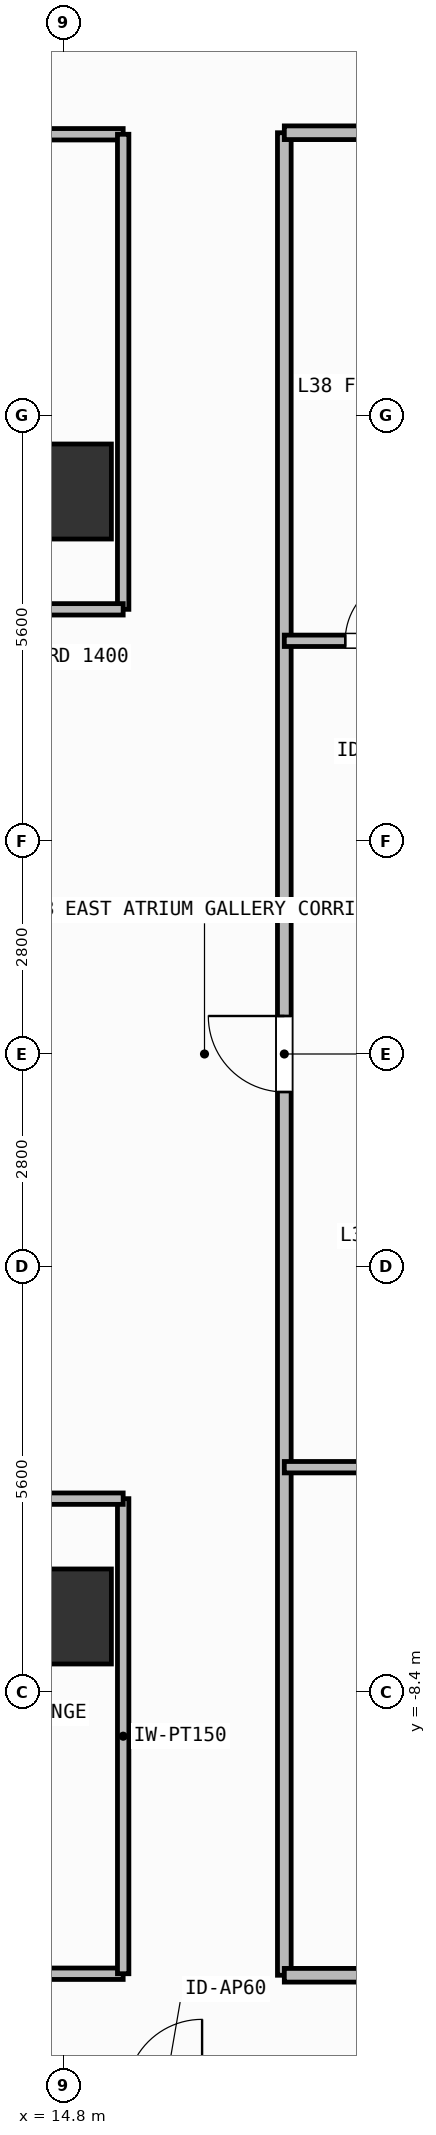
"""IFC4 building model, lengths in metres.
Left out: names, types, materials, properties, quantities, classifications, styles, units other than length and angle.
Written with IfcOpenShell. Run it as: python <this file> out.ifc"""

import sys

from ifc_helpers import new_model, si_unit, direction, frame, frame_2d, origin, origin_2d, place, context, subcontext, project, spatial, rectangle, extrude, element, fill, save


model = new_model("IFC4")
c1 = context("Model", 3, precision=1e-05, world=origin(), true_north=direction((0.0, 1.0)))
c2 = subcontext(c1, "Body", "Model", "MODEL_VIEW")
j1 = project(units=[si_unit("LENGTHUNIT", "METRE"), si_unit("PLANEANGLEUNIT", "RADIAN")], contexts=[c1])
p1 = place(None, origin())
s1 = spatial("IfcSite", under=j1, at=p1, CompositionType="ELEMENT")
p2 = place(p1, origin())
s2 = spatial("IfcBuilding", under=s1, at=p2, CompositionType="ELEMENT")
p3 = place(p2, frame((0.0, 0.0, 152.4)))
s3 = spatial("IfcBuildingStorey", under=s2, at=p3, CompositionType="ELEMENT", Elevation=152.4)
for number, where, z_axis, x_axis in (
    (1, (14.8, -7.4, 0.0), (0.0, 0.0, 1.0), (1.0, 0.0, 0.0)),
    (2, (14.8, 7.4, 0.0), (0.0, 0.0, 1.0), (1.0, 0.0, 0.0)),
):
    element("IfcColumn", number, at=place(p3, frame(where, z_axis=z_axis, x_axis=x_axis)), inside=s3, PredefinedType="COLUMN", context=c2, shape_type="SweptSolid", body=[
        extrude(rectangle(XDim=1.25, YDim=1.25, at=origin_2d()), origin(), (0.0, 0.0, 1.0), 3.9),
    ])
p4 = place(p3, frame((10.1, -12.1, 0.0), z_axis=(0.0, 0.0, 1.0), x_axis=(1.0, 0.0, 0.0)))
e3 = element("IfcWall", 3, at=p4, inside=s3, PredefinedType="PARTITIONING", context=c2, shape_type="SweptSolid", body=[
    extrude(rectangle(XDim=5.48, YDim=0.15, at=frame_2d((2.74, 0.0))), origin(), (0.0, 0.0, 1.0), 3.6),
])
p5 = place(p4, frame((2.29, 0.0, 0.0)))
e4 = element("IfcOpeningElement", 4, at=p5, cuts=e3, PredefinedType="OPENING", context=c2, shape_type="SweptSolid", body=[
    extrude(rectangle(XDim=0.9, YDim=2.1, at=frame_2d((0.45, 1.05))), frame((0.0, 0.085, 0.0), z_axis=(0.0, -1.0, 0.0), x_axis=(1.0, 0.0, 0.0)), (0.0, 0.0, 1.0), 0.17),
])
p6 = place(p3, frame((8.36, 12.1, 0.0), z_axis=(0.0, 0.0, 1.0), x_axis=(1.0, 0.0, 0.0)))
e5 = element("IfcWall", 5, at=p6, inside=s3, PredefinedType="PARTITIONING", context=c2, shape_type="SweptSolid", body=[
    extrude(rectangle(XDim=7.22, YDim=0.15, at=frame_2d((3.61, 0.0))), origin(), (0.0, 0.0, 1.0), 3.6),
])
p7 = place(p6, frame((3.513, 0.0, 0.0)))
e6 = element("IfcOpeningElement", 6, at=p7, cuts=e5, PredefinedType="OPENING", context=c2, shape_type="SweptSolid", body=[
    extrude(rectangle(XDim=0.9, YDim=2.1, at=frame_2d((0.45, 1.05))), frame((0.0, 0.085, 0.0), z_axis=(0.0, -1.0, 0.0), x_axis=(1.0, 0.0, 0.0)), (0.0, 0.0, 1.0), 0.17),
])
p8 = place(p3, frame((17.7, -12.12, 0.0), z_axis=(0.0, 0.0, 1.0), x_axis=(0.0, 1.0, 0.0)))
e7 = element("IfcWall", 7, at=p8, inside=s3, PredefinedType="PARTITIONING", context=c2, shape_type="SweptSolid", body=[
    extrude(rectangle(XDim=24.24, YDim=0.18, at=frame_2d((12.12, 0.0))), origin(), (0.0, 0.0, 1.0), 3.6),
])
p9 = place(p8, frame((11.62, 0.0, 0.0)))
e8 = element("IfcOpeningElement", 8, at=p9, cuts=e7, PredefinedType="OPENING", context=c2, shape_type="SweptSolid", body=[
    extrude(rectangle(XDim=1.0, YDim=2.2, at=frame_2d((0.5, 1.1))), frame((0.0, 0.1, 0.0), z_axis=(0.0, -1.0, 0.0), x_axis=(1.0, 0.0, 0.0)), (0.0, 0.0, 1.0), 0.2),
])
p10 = place(p3, frame((17.7, 5.436, 0.0), z_axis=(0.0, 0.0, 1.0), x_axis=(1.0, 0.0, 0.0)))
e9 = element("IfcWall", 9, at=p10, inside=s3, PredefinedType="PARTITIONING", context=c2, shape_type="SweptSolid", body=[
    extrude(rectangle(XDim=2.292, YDim=0.15, at=frame_2d((1.146, 0.0))), origin(), (0.0, 0.0, 1.0), 3.6),
])
p11 = place(p10, frame((0.801, 0.0, 0.0)))
e10 = element("IfcOpeningElement", 10, at=p11, cuts=e9, PredefinedType="OPENING", context=c2, shape_type="SweptSolid", body=[
    extrude(rectangle(XDim=0.85, YDim=2.1, at=frame_2d((0.425, 1.05))), frame((0.0, 0.085, 0.0), z_axis=(0.0, -1.0, 0.0), x_axis=(1.0, 0.0, 0.0)), (0.0, 0.0, 1.0), 0.17),
])
p12 = place(p3, frame((17.7, -5.436, 0.0), z_axis=(0.0, 0.0, 1.0), x_axis=(1.0, 0.0, 0.0)))
e11 = element("IfcWall", 11, at=p12, inside=s3, PredefinedType="PARTITIONING", context=c2, shape_type="SweptSolid", body=[
    extrude(rectangle(XDim=5.59, YDim=0.15, at=frame_2d((2.795, 0.0))), origin(), (0.0, 0.0, 1.0), 3.6),
])
p13 = place(p12, frame((2.812, 0.0, 0.0)))
e12 = element("IfcOpeningElement", 12, at=p13, cuts=e11, PredefinedType="OPENING", context=c2, shape_type="SweptSolid", body=[
    extrude(rectangle(XDim=0.85, YDim=2.1, at=frame_2d((0.425, 1.05))), frame((0.0, 0.085, 0.0), z_axis=(0.0, -1.0, 0.0), x_axis=(1.0, 0.0, 0.0)), (0.0, 0.0, 1.0), 0.17),
])
p14 = place(p3, frame((15.58, -12.1, 0.0), z_axis=(0.0, 0.0, 1.0), x_axis=(0.0, 1.0, 0.0)))
e13 = element("IfcWall", 13, at=p14, inside=s3, PredefinedType="PARTITIONING", context=c2, shape_type="SweptSolid", body=[
    extrude(rectangle(XDim=6.25, YDim=0.15, at=frame_2d((3.125, 0.0))), origin(), (0.0, 0.0, 1.0), 3.6),
])
p15 = place(p3, frame((8.96, -5.85, 0.0), z_axis=(0.0, 0.0, 1.0), x_axis=(1.0, 0.0, 0.0)))
e14 = element("IfcWall", 14, at=p15, inside=s3, PredefinedType="PARTITIONING", context=c2, shape_type="SweptSolid", body=[
    extrude(rectangle(XDim=6.62, YDim=0.15, at=frame_2d((3.31, 0.0))), origin(), (0.0, 0.0, 1.0), 3.6),
])
p16 = place(p3, frame((15.58, 5.85, 0.0), z_axis=(0.0, 0.0, 1.0), x_axis=(0.0, 1.0, 0.0)))
e15 = element("IfcWall", 15, at=p16, inside=s3, PredefinedType="PARTITIONING", context=c2, shape_type="SweptSolid", body=[
    extrude(rectangle(XDim=6.25, YDim=0.15, at=frame_2d((3.125, 0.0))), origin(), (0.0, 0.0, 1.0), 3.6),
])
p17 = place(p3, frame((8.96, 5.85, 0.0), z_axis=(0.0, 0.0, 1.0), x_axis=(1.0, 0.0, 0.0)))
e16 = element("IfcWall", 16, at=p17, inside=s3, PredefinedType="PARTITIONING", context=c2, shape_type="SweptSolid", body=[
    extrude(rectangle(XDim=6.62, YDim=0.15, at=frame_2d((3.31, 0.0))), origin(), (0.0, 0.0, 1.0), 3.6),
])
for number, where, z_axis, x_axis in (
    (17, (17.7, -12.12, 0.0), (0.0, 0.0, 1.0), (1.0, 0.0, 0.0)),
    (18, (17.7, 12.12, 0.0), (0.0, 0.0, 1.0), (1.0, 0.0, 0.0)),
):
    element("IfcWall", number, at=place(p3, frame(where, z_axis=z_axis, x_axis=x_axis)), inside=s3, PredefinedType="PARTITIONING", context=c2, shape_type="SweptSolid", body=[
        extrude(rectangle(XDim=9.83, YDim=0.18, at=frame_2d((4.915, 0.0))), origin(), (0.0, 0.0, 1.0), 3.6),
    ])
p18 = place(p9, origin())
e19 = element("IfcDoor", 19, at=p18, inside=s3, OperationType="SINGLE_SWING_RIGHT", PredefinedType="DOOR", context=c2, shape_type="SweptSolid", body=[
    extrude(rectangle(XDim=1.0, YDim=2.2, at=frame_2d((0.5, 1.1))), frame((0.0, 0.025, 0.0), z_axis=(0.0, -1.0, 0.0), x_axis=(1.0, 0.0, 0.0)), (0.0, 0.0, 1.0), 0.05),
])
fill(e8, e19)
p19 = place(p11, origin())
e20 = element("IfcDoor", 20, at=p19, inside=s3, OperationType="SINGLE_SWING_RIGHT", PredefinedType="DOOR", context=c2, shape_type="SweptSolid", body=[
    extrude(rectangle(XDim=0.85, YDim=2.1, at=frame_2d((0.425, 1.05))), frame((0.0, 0.025, 0.0), z_axis=(0.0, -1.0, 0.0), x_axis=(1.0, 0.0, 0.0)), (0.0, 0.0, 1.0), 0.05),
])
fill(e10, e20)
save(model, sys.argv[1])
